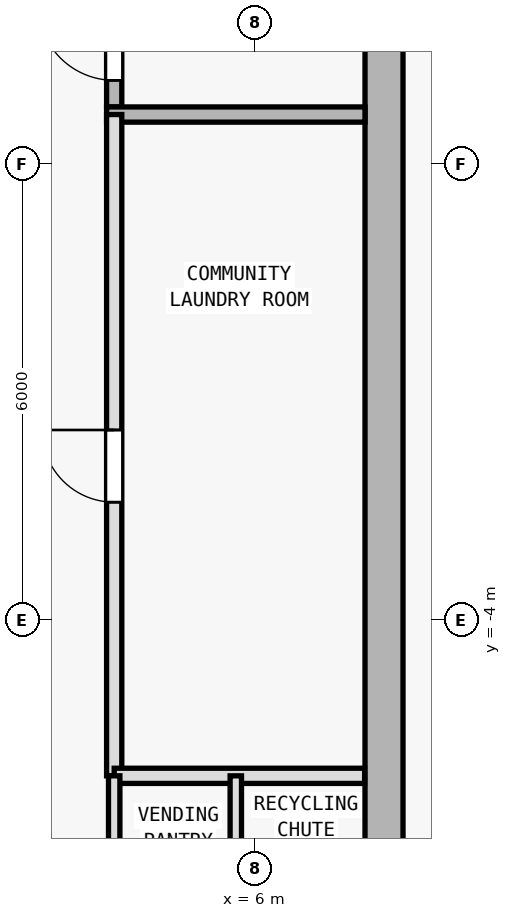
"""IFC4 building model, lengths in metres.
Left out: names, types, materials, properties, quantities, classifications, styles, units other than length and angle.
Written with IfcOpenShell. Run it as: python <this file> out.ifc"""

import sys

from ifc_helpers import new_model, si_unit, direction, frame, frame_2d, origin, origin_2d, place, context, subcontext, project, spatial, rectangle, i_section, extrude, element, fill, save


model = new_model("IFC4")
c1 = context("Model", 3, precision=1e-05, world=origin(), true_north=direction((0.0, 1.0)))
c2 = subcontext(c1, "Body", "Model", "MODEL_VIEW")
j1 = project(units=[si_unit("LENGTHUNIT", "METRE"), si_unit("PLANEANGLEUNIT", "RADIAN")], contexts=[c1])
p1 = place(None, origin())
s1 = spatial("IfcSite", under=j1, at=p1, CompositionType="ELEMENT")
p2 = place(p1, origin())
s2 = spatial("IfcBuilding", under=s1, at=p2, CompositionType="ELEMENT")
p3 = place(p2, frame((0.0, 0.0, 254.4)))
s3 = spatial("IfcBuildingStorey", under=s2, at=p3, CompositionType="ELEMENT", Elevation=254.4)
p4 = place(p3, frame((7.7, 0.4, 0.0), z_axis=(0.0, 0.0, 1.0), x_axis=(1.0, 0.0, 0.0)))
e1 = element("IfcColumn", 1, at=p4, inside=s3, PredefinedType="COLUMN", context=c2, shape_type="SweptSolid", body=[
    extrude(i_section(OverallWidth=0.374, OverallDepth=0.372, WebThickness=0.012, FlangeThickness=0.02, FilletRadius=0.015, at=origin_2d()), origin(), (0.0, 0.0, 1.0), 3.6),
])
p5 = place(p3, frame((7.7, 9.95, 0.0), z_axis=(0.0, 0.0, 1.0), x_axis=(0.0, -1.0, 0.0)))
e2 = element("IfcWall", 2, at=p5, inside=s3, PredefinedType="SHEAR", context=c2, shape_type="SweptSolid", body=[
    extrude(rectangle(XDim=19.1, YDim=0.5, at=frame_2d((9.55, 0.0))), origin(), (0.0, 0.0, 1.0), 3.35),
])
p6 = place(p3, frame((4.15, 2.75, 0.0), z_axis=(0.0, 0.0, 1.0), x_axis=(0.0, 1.0, 0.0)))
e3 = element("IfcWall", 3, at=p6, inside=s3, PredefinedType="SOLIDWALL", context=c2, shape_type="SweptSolid", body=[
    extrude(rectangle(XDim=7.2, YDim=0.2, at=frame_2d((3.6, 0.0))), origin(), (0.0, 0.0, 1.0), 3.35),
])
p7 = place(p6, frame((0.35, 0.0, 0.0)))
e4 = element("IfcOpeningElement", 4, at=p7, cuts=e3, PredefinedType="OPENING", context=c2, shape_type="SweptSolid", body=[
    extrude(rectangle(XDim=1.0, YDim=2.15, at=frame_2d((0.5, 1.075))), frame((0.0, 0.11, 0.0), z_axis=(0.0, -1.0, 0.0), x_axis=(1.0, 0.0, 0.0)), (0.0, 0.0, 1.0), 0.22),
])
p8 = place(p3, frame((4.05, 2.65, 0.0), z_axis=(0.0, 0.0, 1.0), x_axis=(1.0, 0.0, 0.0)))
e5 = element("IfcWall", 5, at=p8, inside=s3, PredefinedType="SOLIDWALL", context=c2, shape_type="SweptSolid", body=[
    extrude(rectangle(XDim=3.4, YDim=0.2, at=frame_2d((1.7, 0.0))), origin(), (0.0, 0.0, 1.0), 3.35),
])
p9 = place(p3, frame((4.15, -6.05, 0.0), z_axis=(0.0, 0.0, 1.0), x_axis=(0.0, 1.0, 0.0)))
e6 = element("IfcWall", 6, at=p9, inside=s3, PredefinedType="SOLIDWALL", context=c2, shape_type="SweptSolid", body=[
    extrude(rectangle(XDim=8.7, YDim=0.2, at=frame_2d((4.35, 0.0))), origin(), (0.0, 0.0, 1.0), 3.35),
])
p10 = place(p9, frame((3.6, 0.0, 0.0)))
e7 = element("IfcOpeningElement", 7, at=p10, cuts=e6, PredefinedType="OPENING", context=c2, shape_type="SweptSolid", body=[
    extrude(rectangle(XDim=0.95, YDim=2.1, at=frame_2d((0.475, 1.05))), frame((0.0, 0.11, 0.0), z_axis=(0.0, -1.0, 0.0), x_axis=(1.0, 0.0, 0.0)), (0.0, 0.0, 1.0), 0.22),
])
p11 = place(p3, frame((4.15, -6.05, 0.0), z_axis=(0.0, 0.0, 1.0), x_axis=(1.0, 0.0, 0.0)))
e8 = element("IfcWall", 8, at=p11, inside=s3, PredefinedType="SOLIDWALL", context=c2, shape_type="SweptSolid", body=[
    extrude(rectangle(XDim=3.295, YDim=0.2, at=frame_2d((1.647, 0.0))), origin(), (0.0, 0.0, 1.0), 3.35),
])
p12 = place(p3, frame((4.15, -9.145, 0.0), z_axis=(0.0, 0.0, 1.0), x_axis=(0.0, 1.0, 0.0)))
e9 = element("IfcWall", 9, at=p12, inside=s3, PredefinedType="PARTITIONING", context=c2, shape_type="SweptSolid", body=[
    extrude(rectangle(XDim=3.095, YDim=0.15, at=frame_2d((1.547, 0.0))), origin(), (0.0, 0.0, 1.0), 3.35),
])
p13 = place(p12, frame((0.845, 0.0, 0.0)))
e10 = element("IfcOpeningElement", 10, at=p13, cuts=e9, PredefinedType="OPENING", context=c2, shape_type="SweptSolid", body=[
    extrude(rectangle(XDim=0.9, YDim=2.1, at=frame_2d((0.45, 1.05))), frame((0.0, 0.085, 0.0), z_axis=(0.0, -1.0, 0.0), x_axis=(1.0, 0.0, 0.0)), (0.0, 0.0, 1.0), 0.17),
])
p14 = place(p3, frame((5.75, -9.145, 0.0), z_axis=(0.0, 0.0, 1.0), x_axis=(0.0, 1.0, 0.0)))
e11 = element("IfcWall", 11, at=p14, inside=s3, PredefinedType="PARTITIONING", context=c2, shape_type="SweptSolid", body=[
    extrude(rectangle(XDim=3.095, YDim=0.15, at=frame_2d((1.547, 0.0))), origin(), (0.0, 0.0, 1.0), 3.35),
])
p15 = place(p14, frame((0.845, 0.0, 0.0)))
e12 = element("IfcOpeningElement", 12, at=p15, cuts=e11, PredefinedType="OPENING", context=c2, shape_type="SweptSolid", body=[
    extrude(rectangle(XDim=0.9, YDim=2.1, at=frame_2d((0.45, 1.05))), frame((0.0, 0.085, 0.0), z_axis=(0.0, -1.0, 0.0), x_axis=(1.0, 0.0, 0.0)), (0.0, 0.0, 1.0), 0.17),
])
p16 = place(p7, origin())
e13 = element("IfcDoor", 13, at=p16, inside=s3, OperationType="SINGLE_SWING_RIGHT", PredefinedType="DOOR", context=c2, shape_type="SweptSolid", body=[
    extrude(rectangle(XDim=1.0, YDim=2.15, at=frame_2d((0.5, 1.075))), frame((0.0, 0.025, 0.0), z_axis=(0.0, -1.0, 0.0), x_axis=(1.0, 0.0, 0.0)), (0.0, 0.0, 1.0), 0.05),
])
fill(e4, e13)
p17 = place(p10, origin())
e14 = element("IfcDoor", 14, at=p17, inside=s3, OperationType="SINGLE_SWING_RIGHT", PredefinedType="DOOR", context=c2, shape_type="SweptSolid", body=[
    extrude(rectangle(XDim=0.95, YDim=2.1, at=frame_2d((0.475, 1.05))), frame((0.0, 0.025, 0.0), z_axis=(0.0, -1.0, 0.0), x_axis=(1.0, 0.0, 0.0)), (0.0, 0.0, 1.0), 0.05),
])
fill(e7, e14)
save(model, sys.argv[1])
